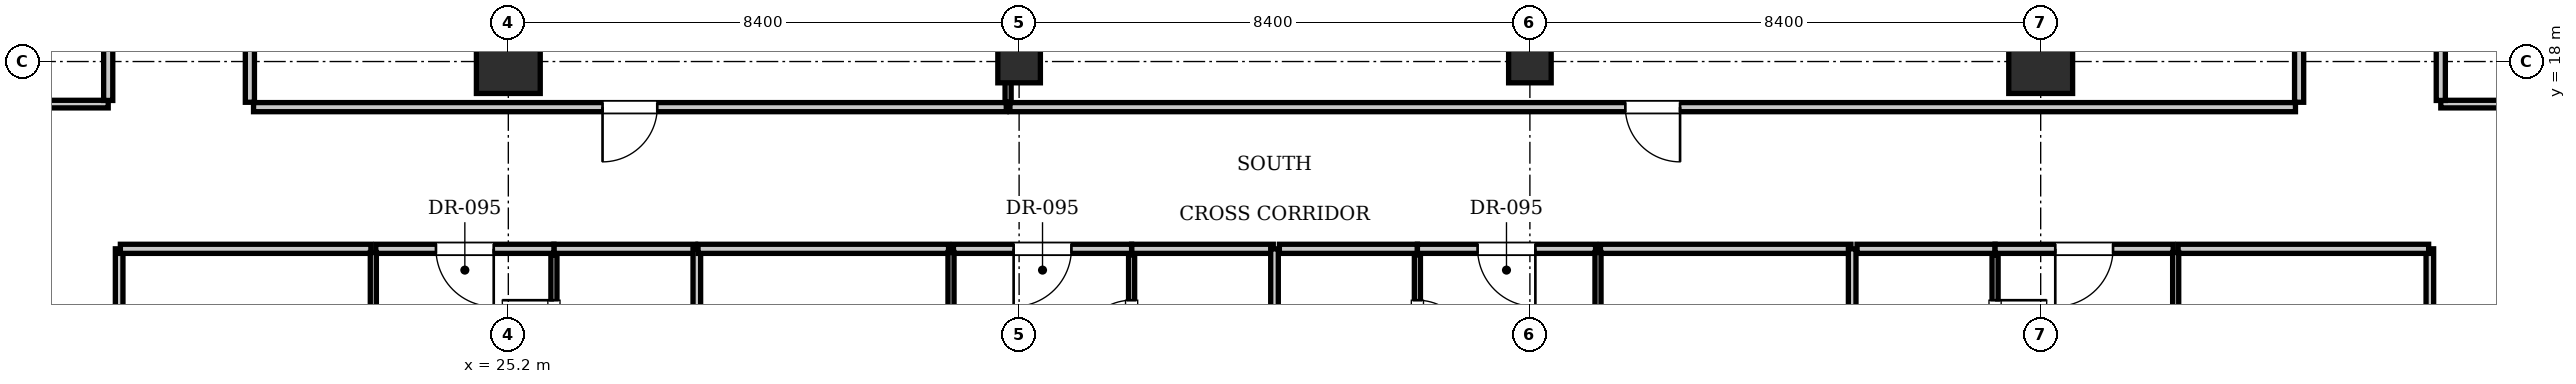
"""IFC4 building model, lengths in metres.
Left out: names, types, materials, properties, quantities, classifications, styles, units other than length and angle.
Written with IfcOpenShell. Run it as: python <this file> out.ifc"""

import sys

from ifc_helpers import new_model, si_unit, direction, frame, frame_2d, origin, origin_2d, place, context, subcontext, project, spatial, rectangle, i_section, extrude, element, fill, save


model = new_model("IFC4")
c1 = context("Model", 3, precision=1e-05, world=origin(), true_north=direction((0.0, 1.0)))
c2 = subcontext(c1, "Body", "Model", "MODEL_VIEW")
j1 = project(units=[si_unit("LENGTHUNIT", "METRE"), si_unit("PLANEANGLEUNIT", "RADIAN")], contexts=[c1])
p1 = place(None, origin())
s1 = spatial("IfcSite", under=j1, at=p1, CompositionType="ELEMENT")
p2 = place(p1, origin())
s2 = spatial("IfcBuilding", under=s1, at=p2, CompositionType="ELEMENT")
p3 = place(p2, frame((0.0, 0.0, 107.8)))
s3 = spatial("IfcBuildingStorey", under=s2, at=p3, CompositionType="ELEMENT", Elevation=107.8)
for number, where, z_axis, x_axis in (
    (1, (25.2, 18.0, 0.0), (0.0, 0.0, 1.0), (1.0, 0.0, 0.0)),
    (2, (50.4, 18.0, 0.0), (0.0, 0.0, 1.0), (1.0, 0.0, 0.0)),
):
    element("IfcColumn", number, at=place(p3, frame(where, z_axis=z_axis, x_axis=x_axis)), inside=s3, PredefinedType="COLUMN", context=c2, shape_type="SweptSolid", body=[
        extrude(rectangle(XDim=1.05, YDim=1.05, at=origin_2d()), origin(), (0.0, 0.0, 1.0), 3.85),
    ])
for number, where, z_axis, x_axis in (
    (3, (33.6, 18.0, 0.0), (0.0, 0.0, 1.0), (1.0, 0.0, 0.0)),
    (4, (42.0, 18.0, 0.0), (0.0, 0.0, 1.0), (1.0, 0.0, 0.0)),
):
    element("IfcColumn", number, at=place(p3, frame(where, z_axis=z_axis, x_axis=x_axis)), inside=s3, PredefinedType="COLUMN", context=c2, shape_type="SweptSolid", body=[
        extrude(i_section(OverallWidth=0.7, OverallDepth=0.7, WebThickness=0.028, FlangeThickness=0.044, at=origin_2d()), origin(), (0.0, 0.0, 1.0), 3.85),
    ])
for number, where, z_axis, x_axis in (
    (5, (20.95, 17.33, 0.0), (0.0, 0.0, 1.0), (0.0, 1.0, 0.0)),
    (6, (54.65, 17.33, 0.0), (0.0, 0.0, 1.0), (0.0, 1.0, 0.0)),
):
    element("IfcWall", number, at=place(p3, frame(where, z_axis=z_axis, x_axis=x_axis)), inside=s3, PredefinedType="PARTITIONING", context=c2, shape_type="SweptSolid", body=[
        extrude(rectangle(XDim=7.33, YDim=0.15, at=frame_2d((3.665, 0.0))), origin(), (0.0, 0.0, 1.0), 3.293),
    ])
p4 = place(p3, frame((21.01, 17.25, 0.0), z_axis=(0.0, 0.0, 1.0), x_axis=(1.0, 0.0, 0.0)))
e7 = element("IfcWall", 7, at=p4, inside=s3, PredefinedType="PARTITIONING", context=c2, shape_type="SweptSolid", body=[
    extrude(rectangle(XDim=12.379, YDim=0.15, at=frame_2d((6.189, 0.0))), origin(), (0.0, 0.0, 1.0), 3.61),
])
p5 = place(p4, frame((5.74, 0.0, 0.0)))
e8 = element("IfcOpeningElement", 8, at=p5, cuts=e7, PredefinedType="OPENING", context=c2, shape_type="SweptSolid", body=[
    extrude(rectangle(XDim=0.9, YDim=2.1, at=frame_2d((0.45, 1.05))), frame((0.0, 0.085, 0.0), z_axis=(0.0, -1.0, 0.0), x_axis=(1.0, 0.0, 0.0)), (0.0, 0.0, 1.0), 0.17),
])
p6 = place(p3, frame((33.419, 17.33, 0.0), z_axis=(0.0, 0.0, 1.0), x_axis=(0.0, 1.0, 0.0)))
e9 = element("IfcWall", 9, at=p6, inside=s3, PredefinedType="PARTITIONING", context=c2, shape_type="SweptSolid", body=[
    extrude(rectangle(XDim=7.33, YDim=0.1, at=frame_2d((3.665, 0.0))), origin(), (0.0, 0.0, 1.0), 2.999),
])
p7 = place(p3, frame((33.449, 17.25, 0.0), z_axis=(0.0, 0.0, 1.0), x_axis=(1.0, 0.0, 0.0)))
e10 = element("IfcWall", 10, at=p7, inside=s3, PredefinedType="PARTITIONING", context=c2, shape_type="SweptSolid", body=[
    extrude(rectangle(XDim=21.141, YDim=0.15, at=frame_2d((10.571, 0.0))), origin(), (0.0, 0.0, 1.0), 3.61),
])
p8 = place(p7, frame((10.121, 0.0, 0.0)))
e11 = element("IfcOpeningElement", 11, at=p8, cuts=e10, PredefinedType="OPENING", context=c2, shape_type="SweptSolid", body=[
    extrude(rectangle(XDim=0.9, YDim=2.1, at=frame_2d((0.45, 1.05))), frame((0.0, 0.085, 0.0), z_axis=(0.0, -1.0, 0.0), x_axis=(1.0, 0.0, 0.0)), (0.0, 0.0, 1.0), 0.17),
])
for number, where, z_axis, x_axis in (
    (12, (18.8, 0.1, 0.0), (0.0, 0.0, 1.0), (0.0, 1.0, 0.0)),
    (13, (56.8, 0.1, 0.0), (0.0, 0.0, 1.0), (0.0, 1.0, 0.0)),
):
    element("IfcWall", number, at=place(p3, frame(where, z_axis=z_axis, x_axis=x_axis)), inside=s3, PredefinedType="PARTITIONING", context=c2, shape_type="SweptSolid", body=[
        extrude(rectangle(XDim=14.82, YDim=0.125, at=frame_2d((7.41, 0.0))), origin(), (0.0, 0.0, 1.0), 3.61),
    ])
p9 = place(p3, frame((25.95, 14.92, 0.0), z_axis=(0.0, 0.0, 1.0), x_axis=(1.0, 0.0, 0.0)))
e14 = element("IfcWall", 14, at=p9, inside=s3, PredefinedType="PARTITIONING", context=c2, shape_type="SweptSolid", body=[
    extrude(rectangle(XDim=2.33, YDim=0.15, at=frame_2d((1.165, 0.0))), origin(), (0.0, 0.0, 1.0), 3.61),
])
p10 = place(p3, frame((25.95, 12.48, 0.0), z_axis=(0.0, 0.0, 1.0), x_axis=(0.0, 1.0, 0.0)))
e15 = element("IfcWall", 15, at=p10, inside=s3, PredefinedType="PARTITIONING", context=c2, shape_type="SweptSolid", body=[
    extrude(rectangle(XDim=2.34, YDim=0.1, at=frame_2d((1.17, 0.0))), origin(), (0.0, 0.0, 1.0), 3.61),
])
p11 = place(p10, frame((0.745, 0.0, 0.0)))
e16 = element("IfcOpeningElement", 16, at=p11, cuts=e15, PredefinedType="OPENING", context=c2, shape_type="SweptSolid", body=[
    extrude(rectangle(XDim=0.85, YDim=2.1, at=frame_2d((0.425, 1.05))), frame((0.0, 0.06, 0.0), z_axis=(0.0, -1.0, 0.0), x_axis=(1.0, 0.0, 0.0)), (0.0, 0.0, 1.0), 0.12),
])
p12 = place(p3, frame((18.82, 14.92, 0.0), z_axis=(0.0, 0.0, 1.0), x_axis=(1.0, 0.0, 0.0)))
e17 = element("IfcWall", 17, at=p12, inside=s3, PredefinedType="PARTITIONING", context=c2, shape_type="SweptSolid", body=[
    extrude(rectangle(XDim=4.12, YDim=0.15, at=frame_2d((2.06, 0.0))), origin(), (0.0, 0.0, 1.0), 3.61),
])
p13 = place(p3, frame((23.02, 14.92, 0.0), z_axis=(0.0, 0.0, 1.0), x_axis=(1.0, 0.0, 0.0)))
e18 = element("IfcWall", 18, at=p13, inside=s3, PredefinedType="PARTITIONING", context=c2, shape_type="SweptSolid", body=[
    extrude(rectangle(XDim=2.93, YDim=0.15, at=frame_2d((1.465, 0.0))), origin(), (0.0, 0.0, 1.0), 3.61),
])
p14 = place(p13, frame((0.99, 0.0, 0.0)))
e19 = element("IfcOpeningElement", 19, at=p14, cuts=e18, PredefinedType="OPENING", context=c2, shape_type="SweptSolid", body=[
    extrude(rectangle(XDim=0.95, YDim=2.15, at=frame_2d((0.475, 1.075))), frame((0.0, 0.085, 0.0), z_axis=(0.0, -1.0, 0.0), x_axis=(1.0, 0.0, 0.0)), (0.0, 0.0, 1.0), 0.17),
])
p15 = place(p3, frame((22.98, 0.03, 0.0), z_axis=(0.0, 0.0, 1.0), x_axis=(0.0, 1.0, 0.0)))
e20 = element("IfcWall", 20, at=p15, inside=s3, PredefinedType="PARTITIONING", context=c2, shape_type="SweptSolid", body=[
    extrude(rectangle(XDim=14.83, YDim=0.1, at=frame_2d((7.415, 0.0))), origin(), (0.0, 0.0, 1.0), 3.61),
])
p16 = place(p15, frame((1.6, 0.0, 0.0)))
e21 = element("IfcOpeningElement", 21, at=p16, cuts=e20, PredefinedType="OPENING", context=c2, shape_type="SweptSolid", body=[
    extrude(rectangle(XDim=0.9, YDim=2.1, at=frame_2d((0.45, 1.05))), frame((0.0, 0.06, 0.0), z_axis=(0.0, -1.0, 0.0), x_axis=(1.0, 0.0, 0.0)), (0.0, 0.0, 1.0), 0.12),
])
p17 = place(p3, frame((28.3, 0.1, 0.0), z_axis=(0.0, 0.0, 1.0), x_axis=(0.0, 1.0, 0.0)))
e22 = element("IfcWall", 22, at=p17, inside=s3, PredefinedType="PARTITIONING", context=c2, shape_type="SweptSolid", body=[
    extrude(rectangle(XDim=14.82, YDim=0.125, at=frame_2d((7.41, 0.0))), origin(), (0.0, 0.0, 1.0), 3.61),
])
p18 = place(p3, frame((35.45, 14.92, 0.0), z_axis=(0.0, 0.0, 1.0), x_axis=(1.0, 0.0, 0.0)))
e23 = element("IfcWall", 23, at=p18, inside=s3, PredefinedType="PARTITIONING", context=c2, shape_type="SweptSolid", body=[
    extrude(rectangle(XDim=2.33, YDim=0.15, at=frame_2d((1.165, 0.0))), origin(), (0.0, 0.0, 1.0), 3.61),
])
p19 = place(p3, frame((35.45, 12.48, 0.0), z_axis=(0.0, 0.0, 1.0), x_axis=(0.0, 1.0, 0.0)))
e24 = element("IfcWall", 24, at=p19, inside=s3, PredefinedType="PARTITIONING", context=c2, shape_type="SweptSolid", body=[
    extrude(rectangle(XDim=2.34, YDim=0.1, at=frame_2d((1.17, 0.0))), origin(), (0.0, 0.0, 1.0), 3.61),
])
p20 = place(p19, frame((0.745, 0.0, 0.0)))
e25 = element("IfcOpeningElement", 25, at=p20, cuts=e24, PredefinedType="OPENING", context=c2, shape_type="SweptSolid", body=[
    extrude(rectangle(XDim=0.85, YDim=2.1, at=frame_2d((0.425, 1.05))), frame((0.0, 0.06, 0.0), z_axis=(0.0, -1.0, 0.0), x_axis=(1.0, 0.0, 0.0)), (0.0, 0.0, 1.0), 0.12),
])
p21 = place(p3, frame((28.32, 14.92, 0.0), z_axis=(0.0, 0.0, 1.0), x_axis=(1.0, 0.0, 0.0)))
e26 = element("IfcWall", 26, at=p21, inside=s3, PredefinedType="PARTITIONING", context=c2, shape_type="SweptSolid", body=[
    extrude(rectangle(XDim=4.12, YDim=0.15, at=frame_2d((2.06, 0.0))), origin(), (0.0, 0.0, 1.0), 3.61),
])
p22 = place(p3, frame((32.52, 14.92, 0.0), z_axis=(0.0, 0.0, 1.0), x_axis=(1.0, 0.0, 0.0)))
e27 = element("IfcWall", 27, at=p22, inside=s3, PredefinedType="PARTITIONING", context=c2, shape_type="SweptSolid", body=[
    extrude(rectangle(XDim=2.93, YDim=0.15, at=frame_2d((1.465, 0.0))), origin(), (0.0, 0.0, 1.0), 3.61),
])
p23 = place(p22, frame((0.99, 0.0, 0.0)))
e28 = element("IfcOpeningElement", 28, at=p23, cuts=e27, PredefinedType="OPENING", context=c2, shape_type="SweptSolid", body=[
    extrude(rectangle(XDim=0.95, YDim=2.15, at=frame_2d((0.475, 1.075))), frame((0.0, 0.085, 0.0), z_axis=(0.0, -1.0, 0.0), x_axis=(1.0, 0.0, 0.0)), (0.0, 0.0, 1.0), 0.17),
])
p24 = place(p3, frame((32.48, 0.03, 0.0), z_axis=(0.0, 0.0, 1.0), x_axis=(0.0, 1.0, 0.0)))
e29 = element("IfcWall", 29, at=p24, inside=s3, PredefinedType="PARTITIONING", context=c2, shape_type="SweptSolid", body=[
    extrude(rectangle(XDim=14.83, YDim=0.1, at=frame_2d((7.415, 0.0))), origin(), (0.0, 0.0, 1.0), 3.61),
])
p25 = place(p24, frame((1.6, 0.0, 0.0)))
e30 = element("IfcOpeningElement", 30, at=p25, cuts=e29, PredefinedType="OPENING", context=c2, shape_type="SweptSolid", body=[
    extrude(rectangle(XDim=0.9, YDim=2.1, at=frame_2d((0.45, 1.05))), frame((0.0, 0.06, 0.0), z_axis=(0.0, -1.0, 0.0), x_axis=(1.0, 0.0, 0.0)), (0.0, 0.0, 1.0), 0.12),
])
p26 = place(p3, frame((37.8, 0.1, 0.0), z_axis=(0.0, 0.0, 1.0), x_axis=(0.0, 1.0, 0.0)))
e31 = element("IfcWall", 31, at=p26, inside=s3, PredefinedType="PARTITIONING", context=c2, shape_type="SweptSolid", body=[
    extrude(rectangle(XDim=14.82, YDim=0.125, at=frame_2d((7.41, 0.0))), origin(), (0.0, 0.0, 1.0), 3.207),
])
p27 = place(p3, frame((37.88, 14.92, 0.0), z_axis=(0.0, 0.0, 1.0), x_axis=(1.0, 0.0, 0.0)))
e32 = element("IfcWall", 32, at=p27, inside=s3, PredefinedType="PARTITIONING", context=c2, shape_type="SweptSolid", body=[
    extrude(rectangle(XDim=2.27, YDim=0.15, at=frame_2d((1.135, 0.0))), origin(), (0.0, 0.0, 1.0), 3.61),
])
p28 = place(p3, frame((40.15, 12.48, 0.0), z_axis=(0.0, 0.0, 1.0), x_axis=(0.0, 1.0, 0.0)))
e33 = element("IfcWall", 33, at=p28, inside=s3, PredefinedType="PARTITIONING", context=c2, shape_type="SweptSolid", body=[
    extrude(rectangle(XDim=2.34, YDim=0.1, at=frame_2d((1.17, 0.0))), origin(), (0.0, 0.0, 1.0), 3.61),
])
p29 = place(p28, frame((0.745, 0.0, 0.0)))
e34 = element("IfcOpeningElement", 34, at=p29, cuts=e33, PredefinedType="OPENING", context=c2, shape_type="SweptSolid", body=[
    extrude(rectangle(XDim=0.85, YDim=2.1, at=frame_2d((0.425, 1.05))), frame((0.0, 0.06, 0.0), z_axis=(0.0, -1.0, 0.0), x_axis=(1.0, 0.0, 0.0)), (0.0, 0.0, 1.0), 0.12),
])
p30 = place(p3, frame((40.15, 14.92, 0.0), z_axis=(0.0, 0.0, 1.0), x_axis=(1.0, 0.0, 0.0)))
e35 = element("IfcWall", 35, at=p30, inside=s3, PredefinedType="PARTITIONING", context=c2, shape_type="SweptSolid", body=[
    extrude(rectangle(XDim=2.93, YDim=0.15, at=frame_2d((1.465, 0.0))), origin(), (0.0, 0.0, 1.0), 3.61),
])
p31 = place(p30, frame((0.99, 0.0, 0.0)))
e36 = element("IfcOpeningElement", 36, at=p31, cuts=e35, PredefinedType="OPENING", context=c2, shape_type="SweptSolid", body=[
    extrude(rectangle(XDim=0.95, YDim=2.15, at=frame_2d((0.475, 1.075))), frame((0.0, 0.085, 0.0), z_axis=(0.0, -1.0, 0.0), x_axis=(1.0, 0.0, 0.0)), (0.0, 0.0, 1.0), 0.17),
])
p32 = place(p3, frame((43.16, 14.92, 0.0), z_axis=(0.0, 0.0, 1.0), x_axis=(1.0, 0.0, 0.0)))
e37 = element("IfcWall", 37, at=p32, inside=s3, PredefinedType="PARTITIONING", context=c2, shape_type="SweptSolid", body=[
    extrude(rectangle(XDim=4.12, YDim=0.15, at=frame_2d((2.06, 0.0))), origin(), (0.0, 0.0, 1.0), 3.61),
])
p33 = place(p3, frame((43.12, 0.03, 0.0), z_axis=(0.0, 0.0, 1.0), x_axis=(0.0, 1.0, 0.0)))
e38 = element("IfcWall", 38, at=p33, inside=s3, PredefinedType="PARTITIONING", context=c2, shape_type="SweptSolid", body=[
    extrude(rectangle(XDim=14.83, YDim=0.1, at=frame_2d((7.415, 0.0))), origin(), (0.0, 0.0, 1.0), 3.61),
])
p34 = place(p33, frame((1.6, 0.0, 0.0)))
e39 = element("IfcOpeningElement", 39, at=p34, cuts=e38, PredefinedType="OPENING", context=c2, shape_type="SweptSolid", body=[
    extrude(rectangle(XDim=0.9, YDim=2.1, at=frame_2d((0.45, 1.05))), frame((0.0, 0.06, 0.0), z_axis=(0.0, -1.0, 0.0), x_axis=(1.0, 0.0, 0.0)), (0.0, 0.0, 1.0), 0.12),
])
p35 = place(p3, frame((47.3, 0.1, 0.0), z_axis=(0.0, 0.0, 1.0), x_axis=(0.0, 1.0, 0.0)))
e40 = element("IfcWall", 40, at=p35, inside=s3, PredefinedType="PARTITIONING", context=c2, shape_type="SweptSolid", body=[
    extrude(rectangle(XDim=14.82, YDim=0.125, at=frame_2d((7.41, 0.0))), origin(), (0.0, 0.0, 1.0), 3.61),
])
p36 = place(p3, frame((47.38, 14.92, 0.0), z_axis=(0.0, 0.0, 1.0), x_axis=(1.0, 0.0, 0.0)))
e41 = element("IfcWall", 41, at=p36, inside=s3, PredefinedType="PARTITIONING", context=c2, shape_type="SweptSolid", body=[
    extrude(rectangle(XDim=2.27, YDim=0.15, at=frame_2d((1.135, 0.0))), origin(), (0.0, 0.0, 1.0), 3.61),
])
p37 = place(p3, frame((49.65, 12.48, 0.0), z_axis=(0.0, 0.0, 1.0), x_axis=(0.0, 1.0, 0.0)))
e42 = element("IfcWall", 42, at=p37, inside=s3, PredefinedType="PARTITIONING", context=c2, shape_type="SweptSolid", body=[
    extrude(rectangle(XDim=2.34, YDim=0.1, at=frame_2d((1.17, 0.0))), origin(), (0.0, 0.0, 1.0), 3.61),
])
p38 = place(p37, frame((0.745, 0.0, 0.0)))
e43 = element("IfcOpeningElement", 43, at=p38, cuts=e42, PredefinedType="OPENING", context=c2, shape_type="SweptSolid", body=[
    extrude(rectangle(XDim=0.85, YDim=2.1, at=frame_2d((0.425, 1.05))), frame((0.0, 0.06, 0.0), z_axis=(0.0, -1.0, 0.0), x_axis=(1.0, 0.0, 0.0)), (0.0, 0.0, 1.0), 0.12),
])
p39 = place(p3, frame((49.65, 14.92, 0.0), z_axis=(0.0, 0.0, 1.0), x_axis=(1.0, 0.0, 0.0)))
e44 = element("IfcWall", 44, at=p39, inside=s3, PredefinedType="PARTITIONING", context=c2, shape_type="SweptSolid", body=[
    extrude(rectangle(XDim=2.93, YDim=0.15, at=frame_2d((1.465, 0.0))), origin(), (0.0, 0.0, 1.0), 3.61),
])
p40 = place(p39, frame((0.99, 0.0, 0.0)))
e45 = element("IfcOpeningElement", 45, at=p40, cuts=e44, PredefinedType="OPENING", context=c2, shape_type="SweptSolid", body=[
    extrude(rectangle(XDim=0.95, YDim=2.15, at=frame_2d((0.475, 1.075))), frame((0.0, 0.085, 0.0), z_axis=(0.0, -1.0, 0.0), x_axis=(1.0, 0.0, 0.0)), (0.0, 0.0, 1.0), 0.17),
])
p41 = place(p3, frame((52.66, 14.92, 0.0), z_axis=(0.0, 0.0, 1.0), x_axis=(1.0, 0.0, 0.0)))
e46 = element("IfcWall", 46, at=p41, inside=s3, PredefinedType="PARTITIONING", context=c2, shape_type="SweptSolid", body=[
    extrude(rectangle(XDim=4.12, YDim=0.15, at=frame_2d((2.06, 0.0))), origin(), (0.0, 0.0, 1.0), 3.61),
])
p42 = place(p3, frame((52.62, 0.03, 0.0), z_axis=(0.0, 0.0, 1.0), x_axis=(0.0, 1.0, 0.0)))
e47 = element("IfcWall", 47, at=p42, inside=s3, PredefinedType="PARTITIONING", context=c2, shape_type="SweptSolid", body=[
    extrude(rectangle(XDim=14.83, YDim=0.1, at=frame_2d((7.415, 0.0))), origin(), (0.0, 0.0, 1.0), 3.61),
])
p43 = place(p42, frame((1.6, 0.0, 0.0)))
e48 = element("IfcOpeningElement", 48, at=p43, cuts=e47, PredefinedType="OPENING", context=c2, shape_type="SweptSolid", body=[
    extrude(rectangle(XDim=0.9, YDim=2.1, at=frame_2d((0.45, 1.05))), frame((0.0, 0.06, 0.0), z_axis=(0.0, -1.0, 0.0), x_axis=(1.0, 0.0, 0.0)), (0.0, 0.0, 1.0), 0.12),
])
p44 = place(p3, frame((10.9, 17.3, 0.0), z_axis=(0.0, 0.0, 1.0), x_axis=(1.0, 0.0, 0.0)))
e49 = element("IfcWall", 49, at=p44, inside=s3, PredefinedType="PARTITIONING", context=c2, shape_type="SweptSolid", body=[
    extrude(rectangle(XDim=7.72, YDim=0.125, at=frame_2d((3.86, 0.0))), origin(), (0.0, 0.0, 1.0), 3.61),
])
p45 = place(p3, frame((56.98, 17.3, 0.0), z_axis=(0.0, 0.0, 1.0), x_axis=(1.0, 0.0, 0.0)))
e50 = element("IfcWall", 50, at=p45, inside=s3, PredefinedType="PARTITIONING", context=c2, shape_type="SweptSolid", body=[
    extrude(rectangle(XDim=7.72, YDim=0.125, at=frame_2d((3.86, 0.0))), origin(), (0.0, 0.0, 1.0), 3.61),
])
for number, where, z_axis, x_axis in (
    (51, (18.62, 17.36, 0.0), (0.0, 0.0, 1.0), (0.0, 1.0, 0.0)),
    (52, (56.98, 17.36, 0.0), (0.0, 0.0, 1.0), (0.0, 1.0, 0.0)),
):
    element("IfcWall", number, at=place(p3, frame(where, z_axis=z_axis, x_axis=x_axis)), inside=s3, PredefinedType="PARTITIONING", context=c2, shape_type="SweptSolid", body=[
        extrude(rectangle(XDim=1.89, YDim=0.15, at=frame_2d((0.945, 0.0))), origin(), (0.0, 0.0, 1.0), 3.61),
    ])
p46 = place(p5, frame((0.9, 0.0, 0.0), z_axis=(0.0, 0.0, 1.0), x_axis=(-1.0, 0.0, 0.0)))
e53 = element("IfcDoor", 53, at=p46, inside=s3, OperationType="SINGLE_SWING_RIGHT", PredefinedType="DOOR", context=c2, shape_type="SweptSolid", body=[
    extrude(rectangle(XDim=0.9, YDim=2.1, at=frame_2d((0.45, 1.05))), frame((0.0, 0.025, 0.0), z_axis=(0.0, -1.0, 0.0), x_axis=(1.0, 0.0, 0.0)), (0.0, 0.0, 1.0), 0.05),
])
fill(e8, e53)
p47 = place(p8, frame((0.9, 0.0, 0.0), z_axis=(0.0, 0.0, 1.0), x_axis=(-1.0, 0.0, 0.0)))
e54 = element("IfcDoor", 54, at=p47, inside=s3, OperationType="SINGLE_SWING_LEFT", PredefinedType="DOOR", context=c2, shape_type="SweptSolid", body=[
    extrude(rectangle(XDim=0.9, YDim=2.1, at=frame_2d((0.45, 1.05))), frame((0.0, 0.025, 0.0), z_axis=(0.0, -1.0, 0.0), x_axis=(1.0, 0.0, 0.0)), (0.0, 0.0, 1.0), 0.05),
])
fill(e11, e54)
p48 = place(p11, origin())
e55 = element("IfcDoor", 55, at=p48, inside=s3, OperationType="SINGLE_SWING_RIGHT", PredefinedType="DOOR", context=c2, shape_type="SweptSolid", body=[
    extrude(rectangle(XDim=0.85, YDim=2.1, at=frame_2d((0.425, 1.05))), frame((0.0, 0.025, 0.0), z_axis=(0.0, -1.0, 0.0), x_axis=(1.0, 0.0, 0.0)), (0.0, 0.0, 1.0), 0.05),
])
fill(e16, e55)
p49 = place(p14, frame((0.95, 0.0, 0.0), z_axis=(0.0, 0.0, 1.0), x_axis=(-1.0, 0.0, 0.0)))
e56 = element("IfcDoor", 56, at=p49, inside=s3, OperationType="SINGLE_SWING_LEFT", PredefinedType="DOOR", context=c2, shape_type="SweptSolid", body=[
    extrude(rectangle(XDim=0.95, YDim=2.15, at=frame_2d((0.475, 1.075))), frame((0.0, 0.025, 0.0), z_axis=(0.0, -1.0, 0.0), x_axis=(1.0, 0.0, 0.0)), (0.0, 0.0, 1.0), 0.05),
])
fill(e19, e56)
p50 = place(p20, origin())
e57 = element("IfcDoor", 57, at=p50, inside=s3, OperationType="SINGLE_SWING_LEFT", PredefinedType="DOOR", context=c2, shape_type="SweptSolid", body=[
    extrude(rectangle(XDim=0.85, YDim=2.1, at=frame_2d((0.425, 1.05))), frame((0.0, 0.025, 0.0), z_axis=(0.0, -1.0, 0.0), x_axis=(1.0, 0.0, 0.0)), (0.0, 0.0, 1.0), 0.05),
])
fill(e25, e57)
p51 = place(p23, frame((0.95, 0.0, 0.0), z_axis=(0.0, 0.0, 1.0), x_axis=(-1.0, 0.0, 0.0)))
e58 = element("IfcDoor", 58, at=p51, inside=s3, OperationType="SINGLE_SWING_RIGHT", PredefinedType="DOOR", context=c2, shape_type="SweptSolid", body=[
    extrude(rectangle(XDim=0.95, YDim=2.15, at=frame_2d((0.475, 1.075))), frame((0.0, 0.025, 0.0), z_axis=(0.0, -1.0, 0.0), x_axis=(1.0, 0.0, 0.0)), (0.0, 0.0, 1.0), 0.05),
])
fill(e28, e58)
p52 = place(p29, frame((0.85, 0.0, 0.0), z_axis=(0.0, 0.0, 1.0), x_axis=(-1.0, 0.0, 0.0)))
e59 = element("IfcDoor", 59, at=p52, inside=s3, OperationType="SINGLE_SWING_RIGHT", PredefinedType="DOOR", context=c2, shape_type="SweptSolid", body=[
    extrude(rectangle(XDim=0.85, YDim=2.1, at=frame_2d((0.425, 1.05))), frame((0.0, 0.025, 0.0), z_axis=(0.0, -1.0, 0.0), x_axis=(1.0, 0.0, 0.0)), (0.0, 0.0, 1.0), 0.05),
])
fill(e34, e59)
p53 = place(p31, frame((0.95, 0.0, 0.0), z_axis=(0.0, 0.0, 1.0), x_axis=(-1.0, 0.0, 0.0)))
e60 = element("IfcDoor", 60, at=p53, inside=s3, OperationType="SINGLE_SWING_LEFT", PredefinedType="DOOR", context=c2, shape_type="SweptSolid", body=[
    extrude(rectangle(XDim=0.95, YDim=2.15, at=frame_2d((0.475, 1.075))), frame((0.0, 0.025, 0.0), z_axis=(0.0, -1.0, 0.0), x_axis=(1.0, 0.0, 0.0)), (0.0, 0.0, 1.0), 0.05),
])
fill(e36, e60)
p54 = place(p38, frame((0.85, 0.0, 0.0), z_axis=(0.0, 0.0, 1.0), x_axis=(-1.0, 0.0, 0.0)))
e61 = element("IfcDoor", 61, at=p54, inside=s3, OperationType="SINGLE_SWING_LEFT", PredefinedType="DOOR", context=c2, shape_type="SweptSolid", body=[
    extrude(rectangle(XDim=0.85, YDim=2.1, at=frame_2d((0.425, 1.05))), frame((0.0, 0.025, 0.0), z_axis=(0.0, -1.0, 0.0), x_axis=(1.0, 0.0, 0.0)), (0.0, 0.0, 1.0), 0.05),
])
fill(e43, e61)
p55 = place(p40, frame((0.95, 0.0, 0.0), z_axis=(0.0, 0.0, 1.0), x_axis=(-1.0, 0.0, 0.0)))
e62 = element("IfcDoor", 62, at=p55, inside=s3, OperationType="SINGLE_SWING_RIGHT", PredefinedType="DOOR", context=c2, shape_type="SweptSolid", body=[
    extrude(rectangle(XDim=0.95, YDim=2.15, at=frame_2d((0.475, 1.075))), frame((0.0, 0.025, 0.0), z_axis=(0.0, -1.0, 0.0), x_axis=(1.0, 0.0, 0.0)), (0.0, 0.0, 1.0), 0.05),
])
fill(e45, e62)
save(model, sys.argv[1])
